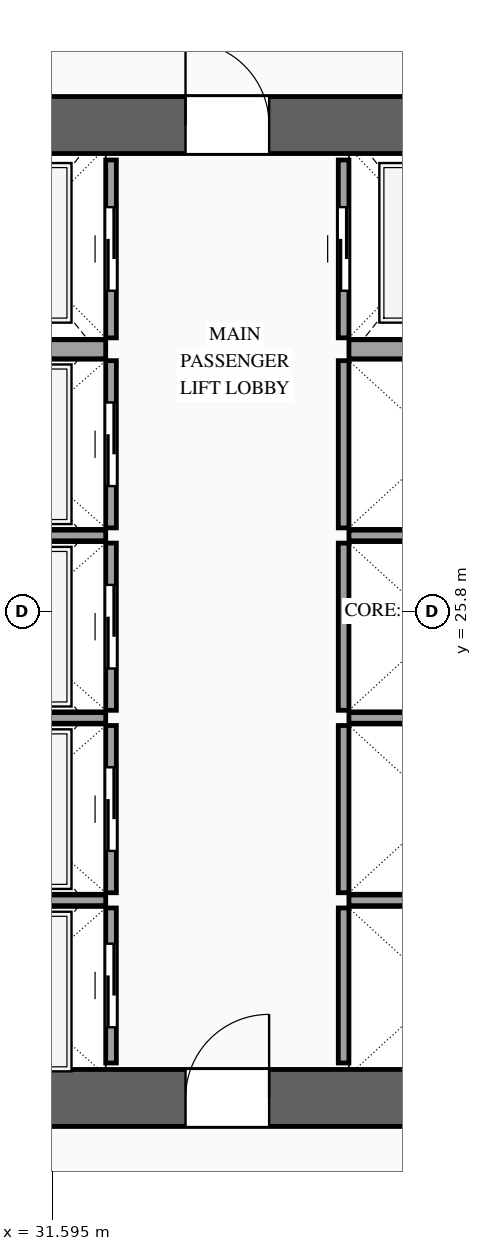
"""IFC4 building model, lengths in metres.
Left out: names, types, materials, properties, quantities, classifications, styles, units other than length and angle.
Written with IfcOpenShell. Run it as: python <this file> out.ifc"""

import sys

from ifc_helpers import new_model, si_unit, direction, frame, frame_2d, origin, place, context, subcontext, project, spatial, rectangle, extrude, source, transform, mapped, element, fill, save


model = new_model("IFC4")
c1 = context("Model", 3, precision=1e-05, world=origin(), true_north=direction((0.0, 1.0)))
c2 = subcontext(c1, "Body", "Model", "MODEL_VIEW")
j1 = project(units=[si_unit("LENGTHUNIT", "METRE"), si_unit("PLANEANGLEUNIT", "RADIAN")], contexts=[c1])
p1 = place(None, origin())
s1 = spatial("IfcSite", under=j1, at=p1, CompositionType="ELEMENT")
p2 = place(p1, origin())
s2 = spatial("IfcBuilding", under=s1, at=p2, CompositionType="ELEMENT")
p3 = place(p2, frame((0.0, 0.0, 111.8)))
s3 = spatial("IfcBuildingStorey", under=s2, at=p3, CompositionType="ELEMENT", Elevation=111.8)
p4 = place(p3, frame((23.425, 19.4, 0.0), z_axis=(0.0, 0.0, 1.0), x_axis=(1.0, 0.0, 0.0)))
e1 = element("IfcWall", 1, at=p4, inside=s3, PredefinedType="SHEAR", context=c2, shape_type="SweptSolid", body=[
    extrude(rectangle(XDim=27.15, YDim=0.75, at=frame_2d((13.575, 0.0))), origin(), (0.0, 0.0, 1.0), 3.6),
])
p5 = place(p4, frame((2.025, 0.0, 0.0)))
e2 = element("IfcOpeningElement", 2, at=p5, cuts=e1, PredefinedType="OPENING", context=c2, shape_type="SweptSolid", body=[
    extrude(rectangle(XDim=1.1, YDim=2.2, at=frame_2d((0.55, 1.1))), frame((0.0, 0.39, 0.0), z_axis=(0.0, -1.0, 0.0), x_axis=(1.0, 0.0, 0.0)), (0.0, 0.0, 1.0), 0.78),
])
p6 = place(p4, frame((9.925, 0.0, 0.0)))
e3 = element("IfcOpeningElement", 3, at=p6, cuts=e1, PredefinedType="OPENING", context=c2, shape_type="SweptSolid", body=[
    extrude(rectangle(XDim=1.1, YDim=2.2, at=frame_2d((0.55, 1.1))), frame((0.0, 0.39, 0.0), z_axis=(0.0, -1.0, 0.0), x_axis=(1.0, 0.0, 0.0)), (0.0, 0.0, 1.0), 0.78),
])
p7 = place(p4, frame((23.125, 0.0, 0.0)))
e4 = element("IfcOpeningElement", 4, at=p7, cuts=e1, PredefinedType="OPENING", context=c2, shape_type="SweptSolid", body=[
    extrude(rectangle(XDim=1.1, YDim=2.2, at=frame_2d((0.55, 1.1))), frame((0.0, 0.39, 0.0), z_axis=(0.0, -1.0, 0.0), x_axis=(1.0, 0.0, 0.0)), (0.0, 0.0, 1.0), 0.78),
])
p8 = place(p4, frame((19.745, 0.0, 0.0)))
e5 = element("IfcOpeningElement", 5, at=p8, cuts=e1, PredefinedType="OPENING", context=c2, shape_type="SweptSolid", body=[
    extrude(rectangle(XDim=0.9, YDim=2.15, at=frame_2d((0.45, 1.075))), frame((0.0, 0.39, 0.0), z_axis=(0.0, -1.0, 0.0), x_axis=(1.0, 0.0, 0.0)), (0.0, 0.0, 1.0), 0.78),
])
p9 = place(p4, frame((18.305, 0.0, 0.0)))
e6 = element("IfcOpeningElement", 6, at=p9, cuts=e1, PredefinedType="OPENING", context=c2, shape_type="SweptSolid", body=[
    extrude(rectangle(XDim=0.9, YDim=2.15, at=frame_2d((0.45, 1.075))), frame((0.0, 0.39, 0.0), z_axis=(0.0, -1.0, 0.0), x_axis=(1.0, 0.0, 0.0)), (0.0, 0.0, 1.0), 0.78),
])
p10 = place(p3, frame((23.425, 32.2, 0.0), z_axis=(0.0, 0.0, 1.0), x_axis=(1.0, 0.0, 0.0)))
e7 = element("IfcWall", 7, at=p10, inside=s3, PredefinedType="SHEAR", context=c2, shape_type="SweptSolid", body=[
    extrude(rectangle(XDim=27.15, YDim=0.75, at=frame_2d((13.575, 0.0))), origin(), (0.0, 0.0, 1.0), 3.6),
])
p11 = place(p10, frame((4.645, 0.0, 0.0)))
e8 = element("IfcOpeningElement", 8, at=p11, cuts=e7, PredefinedType="OPENING", context=c2, shape_type="SweptSolid", body=[
    extrude(rectangle(XDim=0.9, YDim=2.15, at=frame_2d((0.45, 1.075))), frame((0.0, 0.39, 0.0), z_axis=(0.0, -1.0, 0.0), x_axis=(1.0, 0.0, 0.0)), (0.0, 0.0, 1.0), 0.78),
])
p12 = place(p10, frame((9.925, 0.0, 0.0)))
e9 = element("IfcOpeningElement", 9, at=p12, cuts=e7, PredefinedType="OPENING", context=c2, shape_type="SweptSolid", body=[
    extrude(rectangle(XDim=1.1, YDim=2.2, at=frame_2d((0.55, 1.1))), frame((0.0, 0.39, 0.0), z_axis=(0.0, -1.0, 0.0), x_axis=(1.0, 0.0, 0.0)), (0.0, 0.0, 1.0), 0.78),
])
p13 = place(p10, frame((15.775, 0.0, 0.0)))
e10 = element("IfcOpeningElement", 10, at=p13, cuts=e7, PredefinedType="OPENING", context=c2, shape_type="SweptSolid", body=[
    extrude(rectangle(XDim=1.1, YDim=2.2, at=frame_2d((0.55, 1.1))), frame((0.0, 0.39, 0.0), z_axis=(0.0, -1.0, 0.0), x_axis=(1.0, 0.0, 0.0)), (0.0, 0.0, 1.0), 0.78),
])
p14 = place(p10, frame((18.305, 0.0, 0.0)))
e11 = element("IfcOpeningElement", 11, at=p14, cuts=e7, PredefinedType="OPENING", context=c2, shape_type="SweptSolid", body=[
    extrude(rectangle(XDim=0.9, YDim=2.15, at=frame_2d((0.45, 1.075))), frame((0.0, 0.39, 0.0), z_axis=(0.0, -1.0, 0.0), x_axis=(1.0, 0.0, 0.0)), (0.0, 0.0, 1.0), 0.78),
])
p15 = place(p10, frame((19.745, 0.0, 0.0)))
e12 = element("IfcOpeningElement", 12, at=p15, cuts=e7, PredefinedType="OPENING", context=c2, shape_type="SweptSolid", body=[
    extrude(rectangle(XDim=0.9, YDim=2.15, at=frame_2d((0.45, 1.075))), frame((0.0, 0.39, 0.0), z_axis=(0.0, -1.0, 0.0), x_axis=(1.0, 0.0, 0.0)), (0.0, 0.0, 1.0), 0.78),
])
p16 = place(p3, frame((32.37, 19.86, 0.0), z_axis=(0.0, 0.0, 1.0), x_axis=(0.0, 1.0, 0.0)))
e13 = element("IfcWall", 13, at=p16, inside=s3, PredefinedType="SOLIDWALL", context=c2, shape_type="SweptSolid", body=[
    extrude(rectangle(XDim=2.04, YDim=0.14, at=frame_2d((1.02, 0.0))), origin(), (0.0, 0.0, 1.0), 3.38),
])
p17 = place(p16, frame((0.47, 0.0, 0.0)))
e14 = element("IfcOpeningElement", 14, at=p17, cuts=e13, PredefinedType="OPENING", context=c2, shape_type="SweptSolid", body=[
    extrude(rectangle(XDim=1.1, YDim=2.2, at=frame_2d((0.55, 1.1))), frame((0.0, 0.085, 0.0), z_axis=(0.0, -1.0, 0.0), x_axis=(1.0, 0.0, 0.0)), (0.0, 0.0, 1.0), 0.17),
])
m1 = source(origin(), c2, "Body", "SweptSolid", [
    extrude(rectangle(XDim=2.5, YDim=0.14, at=frame_2d((1.25, 0.0))), origin(), (0.0, 0.0, 1.0), 3.38),
])
p18 = place(p3, frame((29.8, 22.0, 0.0), z_axis=(0.0, 0.0, 1.0), x_axis=(1.0, 0.0, 0.0)))
e15 = element("IfcWall", 15, at=p18, inside=s3, PredefinedType="SOLIDWALL", context=c2, shape_type="MappedRepresentation", body=[
    mapped(m1, transform((0.0, 0.0, 0.0), scale=1.0)),
])
p19 = place(p3, frame((32.37, 22.1, 0.0), z_axis=(0.0, 0.0, 1.0), x_axis=(0.0, 1.0, 0.0)))
e16 = element("IfcWall", 16, at=p19, inside=s3, PredefinedType="SOLIDWALL", context=c2, shape_type="SweptSolid", body=[
    extrude(rectangle(XDim=2.2, YDim=0.14, at=frame_2d((1.1, 0.0))), origin(), (0.0, 0.0, 1.0), 3.38),
])
p20 = place(p19, frame((0.55, 0.0, 0.0)))
e17 = element("IfcOpeningElement", 17, at=p20, cuts=e16, PredefinedType="OPENING", context=c2, shape_type="SweptSolid", body=[
    extrude(rectangle(XDim=1.1, YDim=2.2, at=frame_2d((0.55, 1.1))), frame((0.0, 0.085, 0.0), z_axis=(0.0, -1.0, 0.0), x_axis=(1.0, 0.0, 0.0)), (0.0, 0.0, 1.0), 0.17),
])
p21 = place(p3, frame((29.8, 24.4, 0.0), z_axis=(0.0, 0.0, 1.0), x_axis=(1.0, 0.0, 0.0)))
e18 = element("IfcWall", 18, at=p21, inside=s3, PredefinedType="SOLIDWALL", context=c2, shape_type="MappedRepresentation", body=[
    mapped(m1, transform((0.0, 0.0, 0.0), scale=1.0)),
])
p22 = place(p3, frame((32.37, 24.5, 0.0), z_axis=(0.0, 0.0, 1.0), x_axis=(0.0, 1.0, 0.0)))
e19 = element("IfcWall", 19, at=p22, inside=s3, PredefinedType="SOLIDWALL", context=c2, shape_type="SweptSolid", body=[
    extrude(rectangle(XDim=2.2, YDim=0.14, at=frame_2d((1.1, 0.0))), origin(), (0.0, 0.0, 1.0), 3.38),
])
p23 = place(p22, frame((0.55, 0.0, 0.0)))
e20 = element("IfcOpeningElement", 20, at=p23, cuts=e19, PredefinedType="OPENING", context=c2, shape_type="SweptSolid", body=[
    extrude(rectangle(XDim=1.1, YDim=2.2, at=frame_2d((0.55, 1.1))), frame((0.0, 0.085, 0.0), z_axis=(0.0, -1.0, 0.0), x_axis=(1.0, 0.0, 0.0)), (0.0, 0.0, 1.0), 0.17),
])
p24 = place(p3, frame((29.8, 26.8, 0.0), z_axis=(0.0, 0.0, 1.0), x_axis=(1.0, 0.0, 0.0)))
e21 = element("IfcWall", 21, at=p24, inside=s3, PredefinedType="SOLIDWALL", context=c2, shape_type="MappedRepresentation", body=[
    mapped(m1, transform((0.0, 0.0, 0.0), scale=1.0)),
])
p25 = place(p3, frame((32.37, 26.9, 0.0), z_axis=(0.0, 0.0, 1.0), x_axis=(0.0, 1.0, 0.0)))
e22 = element("IfcWall", 22, at=p25, inside=s3, PredefinedType="SOLIDWALL", context=c2, shape_type="SweptSolid", body=[
    extrude(rectangle(XDim=2.2, YDim=0.14, at=frame_2d((1.1, 0.0))), origin(), (0.0, 0.0, 1.0), 3.38),
])
p26 = place(p25, frame((0.55, 0.0, 0.0)))
e23 = element("IfcOpeningElement", 23, at=p26, cuts=e22, PredefinedType="OPENING", context=c2, shape_type="SweptSolid", body=[
    extrude(rectangle(XDim=1.1, YDim=2.2, at=frame_2d((0.55, 1.1))), frame((0.0, 0.085, 0.0), z_axis=(0.0, -1.0, 0.0), x_axis=(1.0, 0.0, 0.0)), (0.0, 0.0, 1.0), 0.17),
])
p27 = place(p3, frame((32.37, 29.4, 0.0), z_axis=(0.0, 0.0, 1.0), x_axis=(0.0, 1.0, 0.0)))
e24 = element("IfcWall", 24, at=p27, inside=s3, PredefinedType="SOLIDWALL", context=c2, shape_type="SweptSolid", body=[
    extrude(rectangle(XDim=2.34, YDim=0.14, at=frame_2d((1.17, 0.0))), origin(), (0.0, 0.0, 1.0), 3.38),
])
p28 = place(p27, frame((0.62, 0.0, 0.0)))
e25 = element("IfcOpeningElement", 25, at=p28, cuts=e24, PredefinedType="OPENING", context=c2, shape_type="SweptSolid", body=[
    extrude(rectangle(XDim=1.1, YDim=2.2, at=frame_2d((0.55, 1.1))), frame((0.0, 0.085, 0.0), z_axis=(0.0, -1.0, 0.0), x_axis=(1.0, 0.0, 0.0)), (0.0, 0.0, 1.0), 0.17),
])
m2 = source(origin(), c2, "Body", "SweptSolid", [
    extrude(rectangle(XDim=2.5, YDim=0.25, at=frame_2d((1.25, 0.0))), origin(), (0.0, 0.0, 1.0), 3.38),
])
p29 = place(p3, frame((29.8, 29.25, 0.0), z_axis=(0.0, 0.0, 1.0), x_axis=(1.0, 0.0, 0.0)))
e26 = element("IfcWall", 26, at=p29, inside=s3, PredefinedType="SOLIDWALL", context=c2, shape_type="MappedRepresentation", body=[
    mapped(m2, transform((0.0, 0.0, 0.0), scale=1.0)),
])
m3 = source(origin(), c2, "Body", "SweptSolid", [
    extrude(rectangle(XDim=2.04, YDim=0.14, at=frame_2d((1.02, 0.0))), origin(), (0.0, 0.0, 1.0), 3.38),
])
p30 = place(p3, frame((35.43, 19.86, 0.0), z_axis=(0.0, 0.0, 1.0), x_axis=(0.0, 1.0, 0.0)))
e27 = element("IfcWall", 27, at=p30, inside=s3, PredefinedType="SOLIDWALL", context=c2, shape_type="MappedRepresentation", body=[
    mapped(m3, transform((0.0, 0.0, 0.0), scale=1.0)),
])
m4 = source(origin(), c2, "Body", "SweptSolid", [
    extrude(rectangle(XDim=2.4, YDim=0.14, at=frame_2d((1.2, 0.0))), origin(), (0.0, 0.0, 1.0), 3.38),
])
p31 = place(p3, frame((35.5, 22.0, 0.0), z_axis=(0.0, 0.0, 1.0), x_axis=(1.0, 0.0, 0.0)))
e28 = element("IfcWall", 28, at=p31, inside=s3, PredefinedType="SOLIDWALL", context=c2, shape_type="MappedRepresentation", body=[
    mapped(m4, transform((0.0, 0.0, 0.0), scale=1.0)),
])
m5 = source(origin(), c2, "Body", "SweptSolid", [
    extrude(rectangle(XDim=2.2, YDim=0.14, at=frame_2d((1.1, 0.0))), origin(), (0.0, 0.0, 1.0), 3.38),
])
p32 = place(p3, frame((35.43, 22.1, 0.0), z_axis=(0.0, 0.0, 1.0), x_axis=(0.0, 1.0, 0.0)))
e29 = element("IfcWall", 29, at=p32, inside=s3, PredefinedType="SOLIDWALL", context=c2, shape_type="MappedRepresentation", body=[
    mapped(m5, transform((0.0, 0.0, 0.0), scale=1.0)),
])
p33 = place(p3, frame((35.5, 24.4, 0.0), z_axis=(0.0, 0.0, 1.0), x_axis=(1.0, 0.0, 0.0)))
e30 = element("IfcWall", 30, at=p33, inside=s3, PredefinedType="SOLIDWALL", context=c2, shape_type="MappedRepresentation", body=[
    mapped(m4, transform((0.0, 0.0, 0.0), scale=1.0)),
])
p34 = place(p3, frame((35.43, 24.5, 0.0), z_axis=(0.0, 0.0, 1.0), x_axis=(0.0, 1.0, 0.0)))
e31 = element("IfcWall", 31, at=p34, inside=s3, PredefinedType="SOLIDWALL", context=c2, shape_type="MappedRepresentation", body=[
    mapped(m5, transform((0.0, 0.0, 0.0), scale=1.0)),
])
p35 = place(p3, frame((35.5, 26.8, 0.0), z_axis=(0.0, 0.0, 1.0), x_axis=(1.0, 0.0, 0.0)))
e32 = element("IfcWall", 32, at=p35, inside=s3, PredefinedType="SOLIDWALL", context=c2, shape_type="MappedRepresentation", body=[
    mapped(m4, transform((0.0, 0.0, 0.0), scale=1.0)),
])
m6 = source(origin(), c2, "Body", "SweptSolid", [
    extrude(rectangle(XDim=2.2, YDim=0.14, at=frame_2d((1.1, 0.0))), origin(), (0.0, 0.0, 1.0), 3.38),
])
p36 = place(p3, frame((35.43, 26.9, 0.0), z_axis=(0.0, 0.0, 1.0), x_axis=(0.0, 1.0, 0.0)))
e33 = element("IfcWall", 33, at=p36, inside=s3, PredefinedType="SOLIDWALL", context=c2, shape_type="MappedRepresentation", body=[
    mapped(m6, transform((0.0, 0.0, 0.0), scale=1.0)),
])
p37 = place(p3, frame((35.43, 29.4, 0.0), z_axis=(0.0, 0.0, 1.0), x_axis=(0.0, 1.0, 0.0)))
e34 = element("IfcWall", 34, at=p37, inside=s3, PredefinedType="SOLIDWALL", context=c2, shape_type="SweptSolid", body=[
    extrude(rectangle(XDim=2.34, YDim=0.14, at=frame_2d((1.17, 0.0))), origin(), (0.0, 0.0, 1.0), 3.38),
])
p38 = place(p37, frame((0.62, 0.0, 0.0)))
e35 = element("IfcOpeningElement", 35, at=p38, cuts=e34, PredefinedType="OPENING", context=c2, shape_type="SweptSolid", body=[
    extrude(rectangle(XDim=1.1, YDim=2.2, at=frame_2d((0.55, 1.1))), frame((0.0, 0.085, 0.0), z_axis=(0.0, -1.0, 0.0), x_axis=(1.0, 0.0, 0.0)), (0.0, 0.0, 1.0), 0.17),
])
m7 = source(origin(), c2, "Body", "SweptSolid", [
    extrude(rectangle(XDim=2.4, YDim=0.25, at=frame_2d((1.2, 0.0))), origin(), (0.0, 0.0, 1.0), 3.38),
])
p39 = place(p3, frame((35.5, 29.25, 0.0), z_axis=(0.0, 0.0, 1.0), x_axis=(1.0, 0.0, 0.0)))
e36 = element("IfcWall", 36, at=p39, inside=s3, PredefinedType="SOLIDWALL", context=c2, shape_type="MappedRepresentation", body=[
    mapped(m7, transform((0.0, 0.0, 0.0), scale=1.0)),
])
m8 = source(origin(), c2, "Body", "SweptSolid", [
    extrude(rectangle(XDim=1.1, YDim=2.2, at=frame_2d((0.55, 1.1))), frame((0.0, 0.025, 0.0), z_axis=(0.0, -1.0, 0.0), x_axis=(1.0, 0.0, 0.0)), (0.0, 0.0, 1.0), 0.05),
])
p40 = place(p17, origin())
e37 = element("IfcDoor", 37, at=p40, inside=s3, OperationType="SLIDING_TO_LEFT", PredefinedType="DOOR", context=c2, shape_type="MappedRepresentation", body=[
    mapped(m8, transform((0.0, 0.0, 0.0), scale=1.0)),
])
fill(e14, e37)
p41 = place(p20, origin())
e38 = element("IfcDoor", 38, at=p41, inside=s3, OperationType="SLIDING_TO_RIGHT", PredefinedType="DOOR", context=c2, shape_type="MappedRepresentation", body=[
    mapped(m8, transform((0.0, 0.0, 0.0), scale=1.0)),
])
fill(e17, e38)
p42 = place(p23, origin())
e39 = element("IfcDoor", 39, at=p42, inside=s3, OperationType="SLIDING_TO_LEFT", PredefinedType="DOOR", context=c2, shape_type="MappedRepresentation", body=[
    mapped(m8, transform((0.0, 0.0, 0.0), scale=1.0)),
])
fill(e20, e39)
p43 = place(p26, origin())
e40 = element("IfcDoor", 40, at=p43, inside=s3, OperationType="SLIDING_TO_RIGHT", PredefinedType="DOOR", context=c2, shape_type="MappedRepresentation", body=[
    mapped(m8, transform((0.0, 0.0, 0.0), scale=1.0)),
])
fill(e23, e40)
p44 = place(p28, origin())
e41 = element("IfcDoor", 41, at=p44, inside=s3, OperationType="SLIDING_TO_LEFT", PredefinedType="DOOR", context=c2, shape_type="MappedRepresentation", body=[
    mapped(m8, transform((0.0, 0.0, 0.0), scale=1.0)),
])
fill(e25, e41)
p45 = place(p38, origin())
e42 = element("IfcDoor", 42, at=p45, inside=s3, OperationType="SLIDING_TO_RIGHT", PredefinedType="DOOR", context=c2, shape_type="MappedRepresentation", body=[
    mapped(m8, transform((0.0, 0.0, 0.0), scale=1.0)),
])
fill(e35, e42)
m9 = source(origin(), c2, "Body", "SweptSolid", [
    extrude(rectangle(XDim=1.1, YDim=2.2, at=frame_2d((0.55, 1.1))), frame((0.0, 0.025, 0.0), z_axis=(0.0, -1.0, 0.0), x_axis=(1.0, 0.0, 0.0)), (0.0, 0.0, 1.0), 0.05),
])
p46 = place(p6, origin())
e43 = element("IfcDoor", 43, at=p46, inside=s3, OperationType="SINGLE_SWING_RIGHT", PredefinedType="DOOR", context=c2, shape_type="MappedRepresentation", body=[
    mapped(m9, transform((0.0, 0.0, 0.0), scale=1.0)),
])
fill(e3, e43)
p47 = place(p12, origin())
e44 = element("IfcDoor", 44, at=p47, inside=s3, OperationType="SINGLE_SWING_LEFT", PredefinedType="DOOR", context=c2, shape_type="MappedRepresentation", body=[
    mapped(m9, transform((0.0, 0.0, 0.0), scale=1.0)),
])
fill(e9, e44)
save(model, sys.argv[1])
